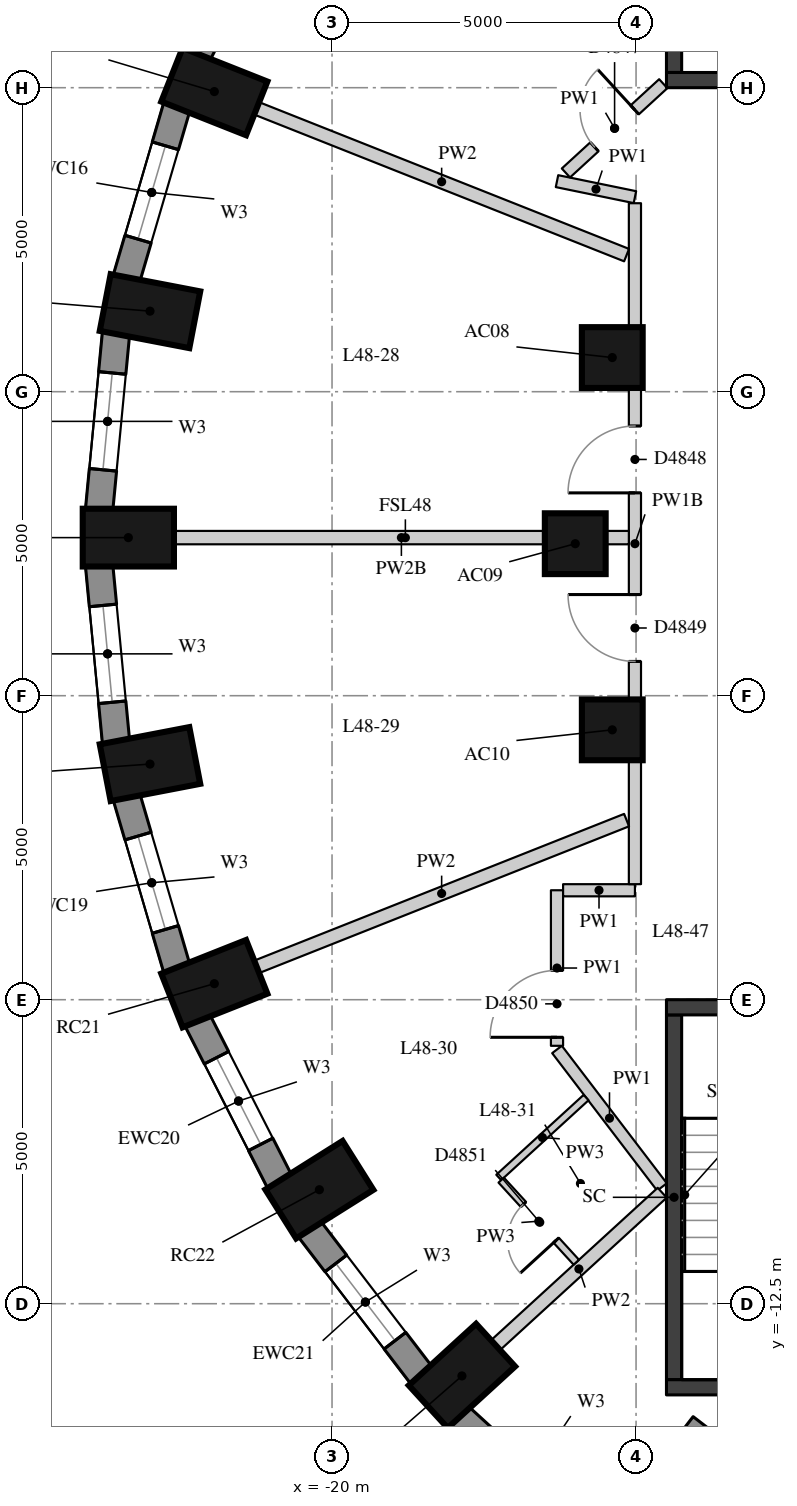
"""IFC4 building model, lengths in metres.
Left out: names, types, materials, properties, quantities, classifications, styles, units other than length and angle.
Written with IfcOpenShell. Run it as: python <this file> out.ifc"""

import sys

from ifc_helpers import new_model, si_unit, direction, frame, frame_2d, origin, origin_2d, place, context, subcontext, project, spatial, rectangle, extrude, element, fill, save


model = new_model("IFC4")
c1 = context("Model", 3, precision=1e-05, world=origin(), true_north=direction((0.0, 1.0)))
c2 = subcontext(c1, "Body", "Model", "MODEL_VIEW")
j1 = project(units=[si_unit("LENGTHUNIT", "METRE"), si_unit("PLANEANGLEUNIT", "RADIAN")], contexts=[c1])
p1 = place(None, origin())
s1 = spatial("IfcSite", under=j1, at=p1, CompositionType="ELEMENT")
p2 = place(p1, origin())
s2 = spatial("IfcBuilding", under=s1, at=p2, CompositionType="ELEMENT")
p3 = place(p2, frame((0.0, 0.0, 171.5)))
s3 = spatial("IfcBuildingStorey", under=s2, at=p3, CompositionType="ELEMENT", Elevation=171.5)
for number, where, z_axis, x_axis in (
    (1, (-21.936, 7.436, 0.0), (0.0, 0.0, 1.0), (-0.93, 0.369, 0.0)),
    (2, (-22.994, 3.825, 0.0), (0.0, 0.0, 1.0), (-0.982, 0.189, 0.0)),
    (3, (-23.35, 0.1, 0.0), (0.0, 0.0, 1.0), (-1.0, 0.0, 0.0)),
    (4, (-22.994, -3.625, 0.0), (0.0, 0.0, 1.0), (-0.982, -0.189, 0.0)),
    (5, (-21.936, -7.236, 0.0), (0.0, 0.0, 1.0), (-0.93, -0.369, 0.0)),
    (6, (-20.208, -10.625, 0.0), (0.0, 0.0, 1.0), (-0.846, -0.533, 0.0)),
    (7, (-17.864, -13.688, 0.0), (0.0, 0.0, 1.0), (-0.738, -0.675, 0.0)),
):
    element("IfcColumn", number, at=place(p3, frame(where, z_axis=z_axis, x_axis=x_axis)), inside=s3, PredefinedType="COLUMN", context=c2, shape_type="SweptSolid", body=[
        extrude(rectangle(XDim=1.5, YDim=0.95, at=origin_2d()), origin(), (0.0, 0.0, 1.0), 3.3),
    ])
for number, where, z_axis, x_axis in (
    (8, (-15.391, 3.062, 0.0), (0.0, 0.0, 1.0), (1.0, 0.0, 0.0)),
    (9, (-16.0, 0.0, 0.0), (0.0, 0.0, 1.0), (1.0, 0.0, 0.0)),
    (10, (-15.391, -3.062, 0.0), (0.0, 0.0, 1.0), (1.0, 0.0, 0.0)),
):
    element("IfcColumn", number, at=place(p3, frame(where, z_axis=z_axis, x_axis=x_axis)), inside=s3, PredefinedType="COLUMN", context=c2, shape_type="SweptSolid", body=[
        extrude(rectangle(XDim=1.0, YDim=1.0, at=origin_2d()), origin(), (0.0, 0.0, 1.0), 3.3),
    ])
p4 = place(p3, frame((-20.859, 10.697, 0.0), z_axis=(0.0, 0.0, 1.0), x_axis=(-0.454133999889, -0.890933392653, 0.0)))
e11 = element("IfcWall", 11, at=p4, inside=s3, PredefinedType="SOLIDWALL", context=c2, shape_type="SweptSolid", body=[
    extrude(rectangle(XDim=2.986, YDim=0.45, at=frame_2d((1.493, 0.0))), origin(), (0.0, 0.0, 1.0), 3.02),
])
p5 = place(p4, frame((0.693, 0.0, 0.4)))
e12 = element("IfcOpeningElement", 12, at=p5, cuts=e11, PredefinedType="OPENING", context=c2, shape_type="SweptSolid", body=[
    extrude(rectangle(XDim=1.6, YDim=1.75, at=frame_2d((0.8, 0.875))), frame((0.0, 0.235, 0.0), z_axis=(0.0, -1.0, 0.0), x_axis=(1.0, 0.0, 0.0)), (0.0, 0.0, 1.0), 0.47),
])
p6 = place(p3, frame((-22.551, 7.191, 0.0), z_axis=(0.0, 0.0, 1.0), x_axis=(-0.281125768296, -0.959670934435, 0.0)))
e13 = element("IfcWall", 13, at=p6, inside=s3, PredefinedType="SOLIDWALL", context=c2, shape_type="SweptSolid", body=[
    extrude(rectangle(XDim=2.948, YDim=0.45, at=frame_2d((1.474, 0.0))), origin(), (0.0, 0.0, 1.0), 3.02),
])
p7 = place(p6, frame((0.674, 0.0, 0.4)))
e14 = element("IfcOpeningElement", 14, at=p7, cuts=e13, PredefinedType="OPENING", context=c2, shape_type="SweptSolid", body=[
    extrude(rectangle(XDim=1.6, YDim=1.75, at=frame_2d((0.8, 0.875))), frame((0.0, 0.235, 0.0), z_axis=(0.0, -1.0, 0.0), x_axis=(1.0, 0.0, 0.0)), (0.0, 0.0, 1.0), 0.47),
])
p8 = place(p3, frame((-23.552, 3.469, 0.0), z_axis=(0.0, 0.0, 1.0), x_axis=(-0.095265737322, -0.995451876935, 0.0)))
e15 = element("IfcWall", 15, at=p8, inside=s3, PredefinedType="SOLIDWALL", context=c2, shape_type="SweptSolid", body=[
    extrude(rectangle(XDim=2.927, YDim=0.45, at=frame_2d((1.463, 0.0))), origin(), (0.0, 0.0, 1.0), 3.02),
])
p9 = place(p8, frame((0.663, 0.0, 0.4)))
e16 = element("IfcOpeningElement", 16, at=p9, cuts=e15, PredefinedType="OPENING", context=c2, shape_type="SweptSolid", body=[
    extrude(rectangle(XDim=1.6, YDim=1.75, at=frame_2d((0.8, 0.875))), frame((0.0, 0.235, 0.0), z_axis=(0.0, -1.0, 0.0), x_axis=(1.0, 0.0, 0.0)), (0.0, 0.0, 1.0), 0.47),
])
p10 = place(p3, frame((-23.831, -0.355, 0.0), z_axis=(0.0, 0.0, 1.0), x_axis=(0.095257827044, -0.995452633924, 0.0)))
e17 = element("IfcWall", 17, at=p10, inside=s3, PredefinedType="SOLIDWALL", context=c2, shape_type="SweptSolid", body=[
    extrude(rectangle(XDim=2.927, YDim=0.45, at=frame_2d((1.463, 0.0))), origin(), (0.0, 0.0, 1.0), 3.02),
])
p11 = place(p10, frame((0.663, 0.0, 0.4)))
e18 = element("IfcOpeningElement", 18, at=p11, cuts=e17, PredefinedType="OPENING", context=c2, shape_type="SweptSolid", body=[
    extrude(rectangle(XDim=1.6, YDim=1.75, at=frame_2d((0.8, 0.875))), frame((0.0, 0.235, 0.0), z_axis=(0.0, -1.0, 0.0), x_axis=(1.0, 0.0, 0.0)), (0.0, 0.0, 1.0), 0.47),
])
p12 = place(p3, frame((-23.38, -4.162, 0.0), z_axis=(0.0, 0.0, 1.0), x_axis=(0.281125768296, -0.959670934435, 0.0)))
e19 = element("IfcWall", 19, at=p12, inside=s3, PredefinedType="SOLIDWALL", context=c2, shape_type="SweptSolid", body=[
    extrude(rectangle(XDim=2.948, YDim=0.45, at=frame_2d((1.474, 0.0))), origin(), (0.0, 0.0, 1.0), 3.02),
])
p13 = place(p12, frame((0.674, 0.0, 0.4)))
e20 = element("IfcOpeningElement", 20, at=p13, cuts=e19, PredefinedType="OPENING", context=c2, shape_type="SweptSolid", body=[
    extrude(rectangle(XDim=1.6, YDim=1.75, at=frame_2d((0.8, 0.875))), frame((0.0, 0.235, 0.0), z_axis=(0.0, -1.0, 0.0), x_axis=(1.0, 0.0, 0.0)), (0.0, 0.0, 1.0), 0.47),
])
p14 = place(p3, frame((-22.215, -7.837, 0.0), z_axis=(0.0, 0.0, 1.0), x_axis=(0.454133999889, -0.890933392653, 0.0)))
e21 = element("IfcWall", 21, at=p14, inside=s3, PredefinedType="SOLIDWALL", context=c2, shape_type="SweptSolid", body=[
    extrude(rectangle(XDim=2.986, YDim=0.45, at=frame_2d((1.493, 0.0))), origin(), (0.0, 0.0, 1.0), 3.02),
])
p15 = place(p14, frame((0.693, 0.0, 0.4)))
e22 = element("IfcOpeningElement", 22, at=p15, cuts=e21, PredefinedType="OPENING", context=c2, shape_type="SweptSolid", body=[
    extrude(rectangle(XDim=1.6, YDim=1.75, at=frame_2d((0.8, 0.875))), frame((0.0, 0.235, 0.0), z_axis=(0.0, -1.0, 0.0), x_axis=(1.0, 0.0, 0.0)), (0.0, 0.0, 1.0), 0.47),
])
p16 = place(p3, frame((-20.374, -11.267, 0.0), z_axis=(0.0, 0.0, 1.0), x_axis=(0.607817056371, -0.794077090706, 0.0)))
e23 = element("IfcWall", 23, at=p16, inside=s3, PredefinedType="SOLIDWALL", context=c2, shape_type="SweptSolid", body=[
    extrude(rectangle(XDim=3.037, YDim=0.45, at=frame_2d((1.519, 0.0))), origin(), (0.0, 0.0, 1.0), 3.02),
])
p17 = place(p16, frame((0.719, 0.0, 0.4)))
e24 = element("IfcOpeningElement", 24, at=p17, cuts=e23, PredefinedType="OPENING", context=c2, shape_type="SweptSolid", body=[
    extrude(rectangle(XDim=1.6, YDim=1.75, at=frame_2d((0.8, 0.875))), frame((0.0, 0.235, 0.0), z_axis=(0.0, -1.0, 0.0), x_axis=(1.0, 0.0, 0.0)), (0.0, 0.0, 1.0), 0.47),
])
p18 = place(p3, frame((-17.913, -14.35, 0.0), z_axis=(0.0, 0.0, 1.0), x_axis=(0.737808755941, -0.675009807082, 0.0)))
e25 = element("IfcWall", 25, at=p18, inside=s3, PredefinedType="SOLIDWALL", context=c2, shape_type="SweptSolid", body=[
    extrude(rectangle(XDim=3.094, YDim=0.45, at=frame_2d((1.547, 0.0))), origin(), (0.0, 0.0, 1.0), 3.02),
])
p19 = place(p18, frame((0.747, 0.0, 0.4)))
e26 = element("IfcOpeningElement", 26, at=p19, cuts=e25, PredefinedType="OPENING", context=c2, shape_type="SweptSolid", body=[
    extrude(rectangle(XDim=1.6, YDim=1.75, at=frame_2d((0.8, 0.875))), frame((0.0, 0.235, 0.0), z_axis=(0.0, -1.0, 0.0), x_axis=(1.0, 0.0, 0.0)), (0.0, 0.0, 1.0), 0.47),
])
p20 = place(p3, frame((-14.731, -15.597, 0.0), z_axis=(0.0, 0.0, 1.0), x_axis=(0.610007638158, 0.792395533423, 0.0)))
e27 = element("IfcWall", 27, at=p20, inside=s3, PredefinedType="SOLIDWALL", context=c2, shape_type="SweptSolid", body=[
    extrude(rectangle(XDim=1.391, YDim=0.45, at=frame_2d((0.695, 0.0))), origin(), (0.0, 0.0, 1.0), 2.57),
])
p21 = place(p3, frame((-14.375, 7.75, -0.28), z_axis=(0.0, 0.0, 1.0), x_axis=(0.0, 1.0, 0.0)))
e28 = element("IfcWall", 28, at=p21, inside=s3, PredefinedType="SHEAR", context=c2, shape_type="SweptSolid", body=[
    extrude(rectangle(XDim=6.0, YDim=0.25, at=frame_2d((3.0, 0.0))), origin(), (0.0, 0.0, 1.0), 3.3),
])
p22 = place(p3, frame((-14.5, 7.625, -0.28), z_axis=(0.0, 0.0, 1.0), x_axis=(1.0, 0.0, 0.0)))
e29 = element("IfcWall", 29, at=p22, inside=s3, PredefinedType="SHEAR", context=c2, shape_type="SweptSolid", body=[
    extrude(rectangle(XDim=5.2, YDim=0.25, at=frame_2d((2.6, 0.0))), origin(), (0.0, 0.0, 1.0), 3.3),
])
p23 = place(p3, frame((-14.375, -13.75, -0.28), z_axis=(0.0, 0.0, 1.0), x_axis=(0.0, 1.0, 0.0)))
e30 = element("IfcWall", 30, at=p23, inside=s3, PredefinedType="SHEAR", context=c2, shape_type="SweptSolid", body=[
    extrude(rectangle(XDim=6.0, YDim=0.25, at=frame_2d((3.0, 0.0))), origin(), (0.0, 0.0, 1.0), 3.3),
])
for number, where, z_axis, x_axis in (
    (31, (-14.5, -7.625, -0.28), (0.0, 0.0, 1.0), (1.0, 0.0, 0.0)),
    (32, (-14.5, -13.875, -0.28), (0.0, 0.0, 1.0), (1.0, 0.0, 0.0)),
):
    element("IfcWall", number, at=place(p3, frame(where, z_axis=z_axis, x_axis=x_axis)), inside=s3, PredefinedType="SHEAR", context=c2, shape_type="SweptSolid", body=[
        extrude(rectangle(XDim=5.2, YDim=0.25, at=frame_2d((2.6, 0.0))), origin(), (0.0, 0.0, 1.0), 3.3),
    ])
p24 = place(p3, frame((-15.019, 5.7, 0.0), z_axis=(0.0, 0.0, 1.0), x_axis=(-0.979555577822, 0.201173730785, 0.0)))
e33 = element("IfcWall", 33, at=p24, inside=s3, PredefinedType="PARTITIONING", context=c2, shape_type="SweptSolid", body=[
    extrude(rectangle(XDim=1.308, YDim=0.2, at=frame_2d((0.654, 0.0))), origin(), (0.0, 0.0, 1.0), 3.02),
])
p25 = place(p3, frame((-16.154, 6.097, 0.0), z_axis=(0.0, 0.0, 1.0), x_axis=(0.736958194284, 0.675938325498, 0.0)))
e34 = element("IfcWall", 34, at=p25, inside=s3, PredefinedType="PARTITIONING", context=c2, shape_type="SweptSolid", body=[
    extrude(rectangle(XDim=2.173, YDim=0.2, at=frame_2d((1.086, 0.0))), origin(), (0.0, 0.0, 1.0), 3.02),
])
p26 = place(p25, frame((0.636, 0.0, 0.0)))
e35 = element("IfcOpeningElement", 35, at=p26, cuts=e34, PredefinedType="OPENING", context=c2, shape_type="SweptSolid", body=[
    extrude(rectangle(XDim=0.9, YDim=2.1, at=frame_2d((0.45, 1.05))), frame((0.0, 0.11, 0.0), z_axis=(0.0, -1.0, 0.0), x_axis=(1.0, 0.0, 0.0)), (0.0, 0.0, 1.0), 0.22),
])
p27 = place(p3, frame((-14.574, -10.58, 0.0), z_axis=(0.0, 0.0, 1.0), x_axis=(-0.606733250298, 0.794905505694, 0.0)))
e36 = element("IfcWall", 36, at=p27, inside=s3, PredefinedType="PARTITIONING", context=c2, shape_type="SweptSolid", body=[
    extrude(rectangle(XDim=2.845, YDim=0.2, at=frame_2d((1.423, 0.0))), origin(), (0.0, 0.0, 1.0), 3.02),
])
p28 = place(p3, frame((-16.3, -8.258, 0.0), z_axis=(0.0, 0.0, 1.0), x_axis=(0.0, 1.0, 0.0)))
e37 = element("IfcWall", 37, at=p28, inside=s3, PredefinedType="PARTITIONING", context=c2, shape_type="SweptSolid", body=[
    extrude(rectangle(XDim=2.558, YDim=0.2, at=frame_2d((1.279, 0.0))), origin(), (0.0, 0.0, 1.0), 3.02),
])
p29 = place(p28, frame((0.14, 0.0, 0.0)))
e38 = element("IfcOpeningElement", 38, at=p29, cuts=e37, PredefinedType="OPENING", context=c2, shape_type="SweptSolid", body=[
    extrude(rectangle(XDim=1.1, YDim=2.1, at=frame_2d((0.55, 1.05))), frame((0.0, 0.11, 0.0), z_axis=(0.0, -1.0, 0.0), x_axis=(1.0, 0.0, 0.0)), (0.0, 0.0, 1.0), 0.22),
])
p30 = place(p3, frame((-16.2, -5.7, 0.0), z_axis=(0.0, 0.0, 1.0), x_axis=(1.0, 0.0, 0.0)))
e39 = element("IfcWall", 39, at=p30, inside=s3, PredefinedType="PARTITIONING", context=c2, shape_type="SweptSolid", body=[
    extrude(rectangle(XDim=1.181, YDim=0.2, at=frame_2d((0.591, 0.0))), origin(), (0.0, 0.0, 1.0), 3.02),
])
p31 = place(p3, frame((-15.019, -5.6, 0.0), z_axis=(0.0, 0.0, 1.0), x_axis=(0.0, 1.0, 0.0)))
e40 = element("IfcWall", 40, at=p31, inside=s3, PredefinedType="PARTITIONING", context=c2, shape_type="SweptSolid", body=[
    extrude(rectangle(XDim=11.2, YDim=0.2, at=frame_2d((5.6, 0.0))), origin(), (0.0, 0.0, 1.0), 2.52),
])
p32 = place(p31, frame((6.436, 0.0, 0.0)))
e41 = element("IfcOpeningElement", 41, at=p32, cuts=e40, PredefinedType="OPENING", context=c2, shape_type="SweptSolid", body=[
    extrude(rectangle(XDim=1.1, YDim=2.1, at=frame_2d((0.55, 1.05))), frame((0.0, 0.11, 0.0), z_axis=(0.0, -1.0, 0.0), x_axis=(1.0, 0.0, 0.0)), (0.0, 0.0, 1.0), 0.22),
])
p33 = place(p31, frame((3.663, 0.0, 0.0)))
e42 = element("IfcOpeningElement", 42, at=p33, cuts=e40, PredefinedType="OPENING", context=c2, shape_type="SweptSolid", body=[
    extrude(rectangle(XDim=1.1, YDim=2.1, at=frame_2d((0.55, 1.05))), frame((0.0, 0.11, 0.0), z_axis=(0.0, -1.0, 0.0), x_axis=(1.0, 0.0, 0.0)), (0.0, 0.0, 1.0), 0.22),
])
p34 = place(p3, frame((-21.239, 7.16, 0.0), z_axis=(0.0, 0.0, 1.0), x_axis=(0.929520145478, -0.368771337215, 0.0)))
e43 = element("IfcWall", 43, at=p34, inside=s3, PredefinedType="PARTITIONING", context=c2, shape_type="SweptSolid", body=[
    extrude(rectangle(XDim=6.544, YDim=0.22, at=frame_2d((3.272, 0.0))), origin(), (0.0, 0.0, 1.0), 3.02),
])
p35 = place(p3, frame((-22.6, 0.1, 0.0), z_axis=(0.0, 0.0, 1.0), x_axis=(1.0, 0.0, 0.0)))
e44 = element("IfcWall", 44, at=p35, inside=s3, PredefinedType="PARTITIONING", context=c2, shape_type="SweptSolid", body=[
    extrude(rectangle(XDim=7.481, YDim=0.22, at=frame_2d((3.741, 0.0))), origin(), (0.0, 0.0, 1.0), 2.57),
])
p36 = place(p3, frame((-21.239, -6.96, 0.0), z_axis=(0.0, 0.0, 1.0), x_axis=(0.929520145478, 0.368771337215, 0.0)))
e45 = element("IfcWall", 45, at=p36, inside=s3, PredefinedType="PARTITIONING", context=c2, shape_type="SweptSolid", body=[
    extrude(rectangle(XDim=6.544, YDim=0.22, at=frame_2d((3.272, 0.0))), origin(), (0.0, 0.0, 1.0), 3.02),
])
p37 = place(p3, frame((-17.31, -13.182, 0.0), z_axis=(0.0, 0.0, 1.0), x_axis=(0.737860436015, 0.674953314655, 0.0)))
e46 = element("IfcWall", 46, at=p37, inside=s3, PredefinedType="PARTITIONING", context=c2, shape_type="SweptSolid", body=[
    extrude(rectangle(XDim=3.714, YDim=0.22, at=frame_2d((1.857, 0.0))), origin(), (0.0, 0.0, 1.0), 3.02),
])
p38 = place(p3, frame((-15.822, -9.11, 0.0), z_axis=(0.0, 0.0, 1.0), x_axis=(-0.737882479632, -0.674929215734, 0.0)))
e47 = element("IfcWall", 47, at=p38, inside=s3, PredefinedType="PARTITIONING", context=c2, shape_type="SweptSolid", body=[
    extrude(rectangle(XDim=1.947, YDim=0.12, at=frame_2d((0.973, 0.0))), origin(), (0.0, 0.0, 1.0), 3.02),
])
p39 = place(p3, frame((-17.218, -10.468, 0.0), z_axis=(0.0, 0.0, 1.0), x_axis=(0.674920747044, -0.737890225717, 0.0)))
e48 = element("IfcWall", 48, at=p39, inside=s3, PredefinedType="PARTITIONING", context=c2, shape_type="SweptSolid", body=[
    extrude(rectangle(XDim=1.83, YDim=0.12, at=frame_2d((0.915, 0.0))), origin(), (0.0, 0.0, 1.0), 3.02),
])
p40 = place(p39, frame((0.54, 0.0, 0.0)))
e49 = element("IfcOpeningElement", 49, at=p40, cuts=e48, PredefinedType="OPENING", context=c2, shape_type="SweptSolid", body=[
    extrude(rectangle(XDim=0.8, YDim=2.1, at=frame_2d((0.4, 1.05))), frame((0.0, 0.07, 0.0), z_axis=(0.0, -1.0, 0.0), x_axis=(1.0, 0.0, 0.0)), (0.0, 0.0, 1.0), 0.14),
])
p41 = place(p7, origin())
e50 = element("IfcWindow", 50, at=p41, inside=s3, PartitioningType="SINGLE_PANEL", PredefinedType="WINDOW", context=c2, shape_type="SweptSolid", body=[
    extrude(rectangle(XDim=1.6, YDim=1.75, at=frame_2d((0.8, 0.875))), frame((0.0, 0.035, 0.0), z_axis=(0.0, -1.0, 0.0), x_axis=(1.0, 0.0, 0.0)), (0.0, 0.0, 1.0), 0.06),
])
fill(e14, e50)
p42 = place(p9, origin())
e51 = element("IfcWindow", 51, at=p42, inside=s3, PartitioningType="SINGLE_PANEL", PredefinedType="WINDOW", context=c2, shape_type="SweptSolid", body=[
    extrude(rectangle(XDim=1.6, YDim=1.75, at=frame_2d((0.8, 0.875))), frame((0.0, 0.035, 0.0), z_axis=(0.0, -1.0, 0.0), x_axis=(1.0, 0.0, 0.0)), (0.0, 0.0, 1.0), 0.06),
])
fill(e16, e51)
p43 = place(p11, origin())
e52 = element("IfcWindow", 52, at=p43, inside=s3, PartitioningType="SINGLE_PANEL", PredefinedType="WINDOW", context=c2, shape_type="SweptSolid", body=[
    extrude(rectangle(XDim=1.6, YDim=1.75, at=frame_2d((0.8, 0.875))), frame((0.0, 0.035, 0.0), z_axis=(0.0, -1.0, 0.0), x_axis=(1.0, 0.0, 0.0)), (0.0, 0.0, 1.0), 0.06),
])
fill(e18, e52)
p44 = place(p13, origin())
e53 = element("IfcWindow", 53, at=p44, inside=s3, PartitioningType="SINGLE_PANEL", PredefinedType="WINDOW", context=c2, shape_type="SweptSolid", body=[
    extrude(rectangle(XDim=1.6, YDim=1.75, at=frame_2d((0.8, 0.875))), frame((0.0, 0.035, 0.0), z_axis=(0.0, -1.0, 0.0), x_axis=(1.0, 0.0, 0.0)), (0.0, 0.0, 1.0), 0.06),
])
fill(e20, e53)
p45 = place(p15, origin())
e54 = element("IfcWindow", 54, at=p45, inside=s3, PartitioningType="SINGLE_PANEL", PredefinedType="WINDOW", context=c2, shape_type="SweptSolid", body=[
    extrude(rectangle(XDim=1.6, YDim=1.75, at=frame_2d((0.8, 0.875))), frame((0.0, 0.035, 0.0), z_axis=(0.0, -1.0, 0.0), x_axis=(1.0, 0.0, 0.0)), (0.0, 0.0, 1.0), 0.06),
])
fill(e22, e54)
p46 = place(p17, origin())
e55 = element("IfcWindow", 55, at=p46, inside=s3, PartitioningType="SINGLE_PANEL", PredefinedType="WINDOW", context=c2, shape_type="SweptSolid", body=[
    extrude(rectangle(XDim=1.6, YDim=1.75, at=frame_2d((0.8, 0.875))), frame((0.0, 0.035, 0.0), z_axis=(0.0, -1.0, 0.0), x_axis=(1.0, 0.0, 0.0)), (0.0, 0.0, 1.0), 0.06),
])
fill(e24, e55)
p47 = place(p26, origin())
e56 = element("IfcDoor", 56, at=p47, inside=s3, OperationType="SINGLE_SWING_RIGHT", PredefinedType="DOOR", context=c2, shape_type="SweptSolid", body=[
    extrude(rectangle(XDim=0.9, YDim=2.1, at=frame_2d((0.45, 1.05))), frame((0.0, 0.025, 0.0), z_axis=(0.0, -1.0, 0.0), x_axis=(1.0, 0.0, 0.0)), (0.0, 0.0, 1.0), 0.05),
])
fill(e35, e56)
p48 = place(p32, origin())
e57 = element("IfcDoor", 57, at=p48, inside=s3, OperationType="SINGLE_SWING_LEFT", PredefinedType="DOOR", context=c2, shape_type="SweptSolid", body=[
    extrude(rectangle(XDim=1.1, YDim=2.1, at=frame_2d((0.55, 1.05))), frame((0.0, 0.025, 0.0), z_axis=(0.0, -1.0, 0.0), x_axis=(1.0, 0.0, 0.0)), (0.0, 0.0, 1.0), 0.05),
])
fill(e41, e57)
p49 = place(p33, origin())
e58 = element("IfcDoor", 58, at=p49, inside=s3, OperationType="SINGLE_SWING_RIGHT", PredefinedType="DOOR", context=c2, shape_type="SweptSolid", body=[
    extrude(rectangle(XDim=1.1, YDim=2.1, at=frame_2d((0.55, 1.05))), frame((0.0, 0.025, 0.0), z_axis=(0.0, -1.0, 0.0), x_axis=(1.0, 0.0, 0.0)), (0.0, 0.0, 1.0), 0.05),
])
fill(e42, e58)
p50 = place(p29, origin())
e59 = element("IfcDoor", 59, at=p50, inside=s3, OperationType="SINGLE_SWING_LEFT", PredefinedType="DOOR", context=c2, shape_type="SweptSolid", body=[
    extrude(rectangle(XDim=1.1, YDim=2.1, at=frame_2d((0.55, 1.05))), frame((0.0, 0.025, 0.0), z_axis=(0.0, -1.0, 0.0), x_axis=(1.0, 0.0, 0.0)), (0.0, 0.0, 1.0), 0.05),
])
fill(e38, e59)
p51 = place(p40, origin())
e60 = element("IfcDoor", 60, at=p51, inside=s3, OperationType="SINGLE_SWING_LEFT", PredefinedType="DOOR", context=c2, shape_type="SweptSolid", body=[
    extrude(rectangle(XDim=0.8, YDim=2.1, at=frame_2d((0.4, 1.05))), frame((0.0, 0.025, 0.0), z_axis=(0.0, -1.0, 0.0), x_axis=(1.0, 0.0, 0.0)), (0.0, 0.0, 1.0), 0.05),
])
fill(e49, e60)
save(model, sys.argv[1])
